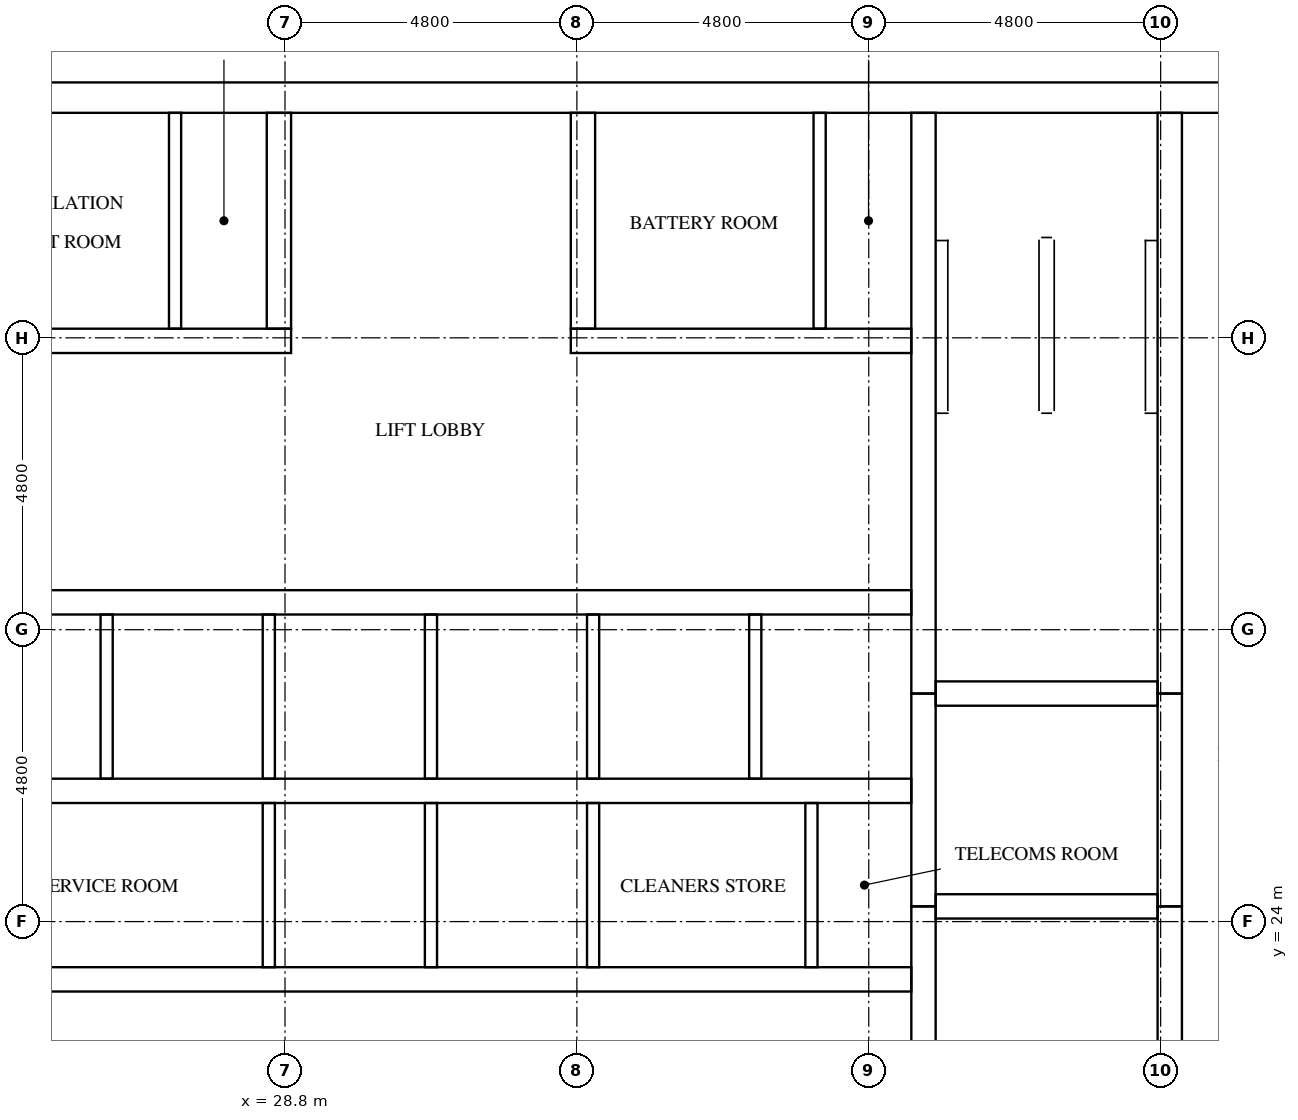
"""IFC4 building model, lengths in metres.
Left out: names, types, materials, properties, quantities, classifications, styles, units other than length and angle.
Written with IfcOpenShell. Run it as: python <this file> out.ifc"""

import sys

from ifc_helpers import new_model, si_unit, direction, frame, frame_2d, origin, place, context, subcontext, project, spatial, rectangle, extrude, element, fill, save


model = new_model("IFC4")
c1 = context("Model", 3, precision=1e-05, world=origin(), true_north=direction((0.0, 1.0)))
c2 = subcontext(c1, "Body", "Model", "MODEL_VIEW")
j1 = project(units=[si_unit("LENGTHUNIT", "METRE"), si_unit("PLANEANGLEUNIT", "RADIAN")], contexts=[c1])
p1 = place(None, origin())
s1 = spatial("IfcSite", under=j1, at=p1, CompositionType="ELEMENT")
p2 = place(p1, origin())
s2 = spatial("IfcBuilding", under=s1, at=p2, CompositionType="ELEMENT")
p3 = place(p2, frame((0.0, 0.0, 272.1)))
s3 = spatial("IfcBuildingStorey", under=s2, at=p3, CompositionType="ELEMENT", Elevation=272.1)
p4 = place(p3, frame((15.0, 37.55, 0.0), z_axis=(0.0, 0.0, 1.0), x_axis=(1.0, 0.0, 0.0)))
e1 = element("IfcWall", 1, at=p4, inside=s3, PredefinedType="SHEAR", context=c2, shape_type="SweptSolid", body=[
    extrude(rectangle(XDim=32.4, YDim=0.5, at=frame_2d((16.2, 0.0))), origin(), (0.0, 0.0, 1.0), 3.2),
])
p5 = place(p4, frame((15.3, 0.0, 0.0)))
e2 = element("IfcOpeningElement", 2, at=p5, cuts=e1, PredefinedType="OPENING", context=c2, shape_type="SweptSolid", body=[
    extrude(rectangle(XDim=1.8, YDim=2.1, at=frame_2d((0.9, 1.05))), frame((0.0, 0.26, 0.0), z_axis=(0.0, -1.0, 0.0), x_axis=(1.0, 0.0, 0.0)), (0.0, 0.0, 1.0), 0.52),
])
p6 = place(p4, frame((1.282, 0.0, 0.0)))
e3 = element("IfcOpeningElement", 3, at=p6, cuts=e1, PredefinedType="OPENING", context=c2, shape_type="SweptSolid", body=[
    extrude(rectangle(XDim=1.0, YDim=2.1, at=frame_2d((0.5, 1.05))), frame((0.0, 0.26, 0.0), z_axis=(0.0, -1.0, 0.0), x_axis=(1.0, 0.0, 0.0)), (0.0, 0.0, 1.0), 0.52),
])
p7 = place(p4, frame((5.082, 0.0, 0.0)))
e4 = element("IfcOpeningElement", 4, at=p7, cuts=e1, PredefinedType="OPENING", context=c2, shape_type="SweptSolid", body=[
    extrude(rectangle(XDim=1.0, YDim=2.1, at=frame_2d((0.5, 1.05))), frame((0.0, 0.26, 0.0), z_axis=(0.0, -1.0, 0.0), x_axis=(1.0, 0.0, 0.0)), (0.0, 0.0, 1.0), 0.52),
])
p8 = place(p3, frame((39.3, 15.5, 0.0), z_axis=(0.0, 0.0, 1.0), x_axis=(0.0, 1.0, 0.0)))
e5 = element("IfcWall", 5, at=p8, inside=s3, PredefinedType="SHEAR", context=c2, shape_type="SweptSolid", body=[
    extrude(rectangle(XDim=8.75, YDim=0.4, at=frame_2d((4.375, 0.0))), origin(), (0.0, 0.0, 1.0), 3.2),
])
p9 = place(p3, frame((39.3, 24.25, 0.0), z_axis=(0.0, 0.0, 1.0), x_axis=(0.0, 1.0, 0.0)))
e6 = element("IfcWall", 6, at=p9, inside=s3, PredefinedType="SHEAR", context=c2, shape_type="SweptSolid", body=[
    extrude(rectangle(XDim=3.5, YDim=0.4, at=frame_2d((1.75, 0.0))), origin(), (0.0, 0.0, 1.0), 3.2),
])
p10 = place(p3, frame((39.3, 27.75, 0.0), z_axis=(0.0, 0.0, 1.0), x_axis=(0.0, 1.0, 0.0)))
e7 = element("IfcWall", 7, at=p10, inside=s3, PredefinedType="SHEAR", context=c2, shape_type="SweptSolid", body=[
    extrude(rectangle(XDim=9.55, YDim=0.4, at=frame_2d((4.775, 0.0))), origin(), (0.0, 0.0, 1.0), 3.2),
])
p11 = place(p3, frame((43.35, 15.5, 0.0), z_axis=(0.0, 0.0, 1.0), x_axis=(0.0, 1.0, 0.0)))
e8 = element("IfcWall", 8, at=p11, inside=s3, PredefinedType="SHEAR", context=c2, shape_type="SweptSolid", body=[
    extrude(rectangle(XDim=8.75, YDim=0.4, at=frame_2d((4.375, 0.0))), origin(), (0.0, 0.0, 1.0), 3.2),
])
p12 = place(p11, frame((0.7, 0.0, 0.0)))
e9 = element("IfcOpeningElement", 9, at=p12, cuts=e8, PredefinedType="OPENING", context=c2, shape_type="SweptSolid", body=[
    extrude(rectangle(XDim=1.2, YDim=2.1, at=frame_2d((0.6, 1.05))), frame((0.0, 0.21, 0.0), z_axis=(0.0, -1.0, 0.0), x_axis=(1.0, 0.0, 0.0)), (0.0, 0.0, 1.0), 0.42),
])
p13 = place(p3, frame((43.35, 24.25, 0.0), z_axis=(0.0, 0.0, 1.0), x_axis=(0.0, 1.0, 0.0)))
e10 = element("IfcWall", 10, at=p13, inside=s3, PredefinedType="SHEAR", context=c2, shape_type="SweptSolid", body=[
    extrude(rectangle(XDim=3.5, YDim=0.4, at=frame_2d((1.75, 0.0))), origin(), (0.0, 0.0, 1.0), 3.2),
])
p14 = place(p13, frame((1.2, 0.0, 0.0)))
e11 = element("IfcOpeningElement", 11, at=p14, cuts=e10, PredefinedType="OPENING", context=c2, shape_type="SweptSolid", body=[
    extrude(rectangle(XDim=1.1, YDim=2.1, at=frame_2d((0.55, 1.05))), frame((0.0, 0.21, 0.0), z_axis=(0.0, -1.0, 0.0), x_axis=(1.0, 0.0, 0.0)), (0.0, 0.0, 1.0), 0.42),
])
p15 = place(p3, frame((43.35, 27.75, 0.0), z_axis=(0.0, 0.0, 1.0), x_axis=(0.0, 1.0, 0.0)))
e12 = element("IfcWall", 12, at=p15, inside=s3, PredefinedType="SHEAR", context=c2, shape_type="SweptSolid", body=[
    extrude(rectangle(XDim=9.55, YDim=0.4, at=frame_2d((4.775, 0.0))), origin(), (0.0, 0.0, 1.0), 3.2),
])
p16 = place(p15, frame((7.65, 0.0, 0.0)))
e13 = element("IfcOpeningElement", 13, at=p16, cuts=e12, PredefinedType="OPENING", context=c2, shape_type="SweptSolid", body=[
    extrude(rectangle(XDim=1.2, YDim=2.1, at=frame_2d((0.6, 1.05))), frame((0.0, 0.21, 0.0), z_axis=(0.0, -1.0, 0.0), x_axis=(1.0, 0.0, 0.0)), (0.0, 0.0, 1.0), 0.42),
])
for number, where, z_axis, x_axis in (
    (14, (39.5, 24.25, 0.0), (0.0, 0.0, 1.0), (1.0, 0.0, 0.0)),
    (15, (39.5, 27.75, 0.0), (0.0, 0.0, 1.0), (1.0, 0.0, 0.0)),
):
    element("IfcWall", number, at=place(p3, frame(where, z_axis=z_axis, x_axis=x_axis)), inside=s3, PredefinedType="SHEAR", context=c2, shape_type="SweptSolid", body=[
        extrude(rectangle(XDim=3.65, YDim=0.4, at=frame_2d((1.825, 0.0))), origin(), (0.0, 0.0, 1.0), 3.2),
    ])
p17 = place(p3, frame((23.3, 23.05, 0.0), z_axis=(0.0, 0.0, 1.0), x_axis=(1.0, 0.0, 0.0)))
e16 = element("IfcWall", 16, at=p17, inside=s3, PredefinedType="SHEAR", context=c2, shape_type="SweptSolid", body=[
    extrude(rectangle(XDim=15.8, YDim=0.4, at=frame_2d((7.9, 0.0))), origin(), (0.0, 0.0, 1.0), 3.2),
])
p18 = place(p17, frame((2.067, 0.0, 0.0)))
e17 = element("IfcOpeningElement", 17, at=p18, cuts=e16, PredefinedType="OPENING", context=c2, shape_type="SweptSolid", body=[
    extrude(rectangle(XDim=1.0, YDim=2.1, at=frame_2d((0.5, 1.05))), frame((0.0, 0.21, 0.0), z_axis=(0.0, -1.0, 0.0), x_axis=(1.0, 0.0, 0.0)), (0.0, 0.0, 1.0), 0.42),
])
p19 = place(p17, frame((11.862, 0.0, 0.0)))
e18 = element("IfcOpeningElement", 18, at=p19, cuts=e16, PredefinedType="OPENING", context=c2, shape_type="SweptSolid", body=[
    extrude(rectangle(XDim=1.0, YDim=2.1, at=frame_2d((0.5, 1.05))), frame((0.0, 0.21, 0.0), z_axis=(0.0, -1.0, 0.0), x_axis=(1.0, 0.0, 0.0)), (0.0, 0.0, 1.0), 0.42),
])
p20 = place(p17, frame((14.529, 0.0, 0.0)))
e19 = element("IfcOpeningElement", 19, at=p20, cuts=e16, PredefinedType="OPENING", context=c2, shape_type="SweptSolid", body=[
    extrude(rectangle(XDim=1.0, YDim=2.1, at=frame_2d((0.5, 1.05))), frame((0.0, 0.21, 0.0), z_axis=(0.0, -1.0, 0.0), x_axis=(1.0, 0.0, 0.0)), (0.0, 0.0, 1.0), 0.42),
])
p21 = place(p3, frame((23.3, 26.15, 0.0), z_axis=(0.0, 0.0, 1.0), x_axis=(1.0, 0.0, 0.0)))
e20 = element("IfcWall", 20, at=p21, inside=s3, PredefinedType="SHEAR", context=c2, shape_type="SweptSolid", body=[
    extrude(rectangle(XDim=15.8, YDim=0.4, at=frame_2d((7.9, 0.0))), origin(), (0.0, 0.0, 1.0), 3.2),
])
p22 = place(p3, frame((23.3, 29.25, 0.0), z_axis=(0.0, 0.0, 1.0), x_axis=(1.0, 0.0, 0.0)))
e21 = element("IfcWall", 21, at=p22, inside=s3, PredefinedType="SHEAR", context=c2, shape_type="SweptSolid", body=[
    extrude(rectangle(XDim=15.8, YDim=0.4, at=frame_2d((7.9, 0.0))), origin(), (0.0, 0.0, 1.0), 3.2),
])
p23 = place(p22, frame((0.683, 0.0, 0.0)))
e22 = element("IfcOpeningElement", 22, at=p23, cuts=e21, PredefinedType="OPENING", context=c2, shape_type="SweptSolid", body=[
    extrude(rectangle(XDim=1.1, YDim=2.1, at=frame_2d((0.55, 1.05))), frame((0.0, 0.21, 0.0), z_axis=(0.0, -1.0, 0.0), x_axis=(1.0, 0.0, 0.0)), (0.0, 0.0, 1.0), 0.42),
])
p24 = place(p22, frame((3.35, 0.0, 0.0)))
e23 = element("IfcOpeningElement", 23, at=p24, cuts=e21, PredefinedType="OPENING", context=c2, shape_type="SweptSolid", body=[
    extrude(rectangle(XDim=1.1, YDim=2.1, at=frame_2d((0.55, 1.05))), frame((0.0, 0.21, 0.0), z_axis=(0.0, -1.0, 0.0), x_axis=(1.0, 0.0, 0.0)), (0.0, 0.0, 1.0), 0.42),
])
p25 = place(p22, frame((6.017, 0.0, 0.0)))
e24 = element("IfcOpeningElement", 24, at=p25, cuts=e21, PredefinedType="OPENING", context=c2, shape_type="SweptSolid", body=[
    extrude(rectangle(XDim=1.1, YDim=2.1, at=frame_2d((0.55, 1.05))), frame((0.0, 0.21, 0.0), z_axis=(0.0, -1.0, 0.0), x_axis=(1.0, 0.0, 0.0)), (0.0, 0.0, 1.0), 0.42),
])
p26 = place(p22, frame((8.683, 0.0, 0.0)))
e25 = element("IfcOpeningElement", 25, at=p26, cuts=e21, PredefinedType="OPENING", context=c2, shape_type="SweptSolid", body=[
    extrude(rectangle(XDim=1.1, YDim=2.1, at=frame_2d((0.55, 1.05))), frame((0.0, 0.21, 0.0), z_axis=(0.0, -1.0, 0.0), x_axis=(1.0, 0.0, 0.0)), (0.0, 0.0, 1.0), 0.42),
])
p27 = place(p22, frame((11.35, 0.0, 0.0)))
e26 = element("IfcOpeningElement", 26, at=p27, cuts=e21, PredefinedType="OPENING", context=c2, shape_type="SweptSolid", body=[
    extrude(rectangle(XDim=1.1, YDim=2.1, at=frame_2d((0.55, 1.05))), frame((0.0, 0.21, 0.0), z_axis=(0.0, -1.0, 0.0), x_axis=(1.0, 0.0, 0.0)), (0.0, 0.0, 1.0), 0.42),
])
p28 = place(p22, frame((14.017, 0.0, 0.0)))
e27 = element("IfcOpeningElement", 27, at=p28, cuts=e21, PredefinedType="OPENING", context=c2, shape_type="SweptSolid", body=[
    extrude(rectangle(XDim=1.1, YDim=2.1, at=frame_2d((0.55, 1.05))), frame((0.0, 0.21, 0.0), z_axis=(0.0, -1.0, 0.0), x_axis=(1.0, 0.0, 0.0)), (0.0, 0.0, 1.0), 0.42),
])
p29 = place(p3, frame((23.3, 33.55, 0.0), z_axis=(0.0, 0.0, 1.0), x_axis=(1.0, 0.0, 0.0)))
e28 = element("IfcWall", 28, at=p29, inside=s3, PredefinedType="SHEAR", context=c2, shape_type="SweptSolid", body=[
    extrude(rectangle(XDim=5.6, YDim=0.4, at=frame_2d((2.8, 0.0))), origin(), (0.0, 0.0, 1.0), 3.2),
])
p30 = place(p29, frame((1.296, 0.0, 0.0)))
e29 = element("IfcOpeningElement", 29, at=p30, cuts=e28, PredefinedType="OPENING", context=c2, shape_type="SweptSolid", body=[
    extrude(rectangle(XDim=1.0, YDim=2.1, at=frame_2d((0.5, 1.05))), frame((0.0, 0.21, 0.0), z_axis=(0.0, -1.0, 0.0), x_axis=(1.0, 0.0, 0.0)), (0.0, 0.0, 1.0), 0.42),
])
p31 = place(p29, frame((3.996, 0.0, 0.0)))
e30 = element("IfcOpeningElement", 30, at=p31, cuts=e28, PredefinedType="OPENING", context=c2, shape_type="SweptSolid", body=[
    extrude(rectangle(XDim=1.0, YDim=2.1, at=frame_2d((0.5, 1.05))), frame((0.0, 0.21, 0.0), z_axis=(0.0, -1.0, 0.0), x_axis=(1.0, 0.0, 0.0)), (0.0, 0.0, 1.0), 0.42),
])
p32 = place(p3, frame((33.5, 33.55, 0.0), z_axis=(0.0, 0.0, 1.0), x_axis=(1.0, 0.0, 0.0)))
e31 = element("IfcWall", 31, at=p32, inside=s3, PredefinedType="SHEAR", context=c2, shape_type="SweptSolid", body=[
    extrude(rectangle(XDim=5.6, YDim=0.4, at=frame_2d((2.8, 0.0))), origin(), (0.0, 0.0, 1.0), 3.2),
])
p33 = place(p32, frame((1.696, 0.0, 0.0)))
e32 = element("IfcOpeningElement", 32, at=p33, cuts=e31, PredefinedType="OPENING", context=c2, shape_type="SweptSolid", body=[
    extrude(rectangle(XDim=1.0, YDim=2.1, at=frame_2d((0.5, 1.05))), frame((0.0, 0.21, 0.0), z_axis=(0.0, -1.0, 0.0), x_axis=(1.0, 0.0, 0.0)), (0.0, 0.0, 1.0), 0.42),
])
p34 = place(p32, frame((4.396, 0.0, 0.0)))
e33 = element("IfcOpeningElement", 33, at=p34, cuts=e31, PredefinedType="OPENING", context=c2, shape_type="SweptSolid", body=[
    extrude(rectangle(XDim=1.0, YDim=2.1, at=frame_2d((0.5, 1.05))), frame((0.0, 0.21, 0.0), z_axis=(0.0, -1.0, 0.0), x_axis=(1.0, 0.0, 0.0)), (0.0, 0.0, 1.0), 0.42),
])
for number, where, z_axis, x_axis in (
    (34, (28.7, 33.75, 0.0), (0.0, 0.0, 1.0), (0.0, 1.0, 0.0)),
    (35, (33.7, 33.75, 0.0), (0.0, 0.0, 1.0), (0.0, 1.0, 0.0)),
):
    element("IfcWall", number, at=place(p3, frame(where, z_axis=z_axis, x_axis=x_axis)), inside=s3, PredefinedType="SHEAR", context=c2, shape_type="SweptSolid", body=[
        extrude(rectangle(XDim=3.55, YDim=0.4, at=frame_2d((1.775, 0.0))), origin(), (0.0, 0.0, 1.0), 3.2),
    ])
for number, where, z_axis, x_axis in (
    (36, (25.867, 26.35, 0.0), (0.0, 0.0, 1.0), (0.0, 1.0, 0.0)),
    (37, (28.533, 23.25, 0.0), (0.0, 0.0, 1.0), (0.0, 1.0, 0.0)),
    (38, (28.533, 26.35, 0.0), (0.0, 0.0, 1.0), (0.0, 1.0, 0.0)),
    (39, (31.2, 23.25, 0.0), (0.0, 0.0, 1.0), (0.0, 1.0, 0.0)),
    (40, (31.2, 26.35, 0.0), (0.0, 0.0, 1.0), (0.0, 1.0, 0.0)),
    (41, (33.867, 23.25, 0.0), (0.0, 0.0, 1.0), (0.0, 1.0, 0.0)),
    (42, (33.867, 26.35, 0.0), (0.0, 0.0, 1.0), (0.0, 1.0, 0.0)),
    (43, (36.533, 26.35, 0.0), (0.0, 0.0, 1.0), (0.0, 1.0, 0.0)),
):
    element("IfcWall", number, at=place(p3, frame(where, z_axis=z_axis, x_axis=x_axis)), inside=s3, PredefinedType="SOLIDWALL", context=c2, shape_type="SweptSolid", body=[
        extrude(rectangle(XDim=2.7, YDim=0.2, at=frame_2d((1.35, 0.0))), origin(), (0.0, 0.0, 1.0), 3.2),
    ])
p35 = place(p3, frame((37.457, 23.25, 0.0), z_axis=(0.0, 0.0, 1.0), x_axis=(0.0, 1.0, 0.0)))
e44 = element("IfcWall", 44, at=p35, inside=s3, PredefinedType="PARTITIONING", context=c2, shape_type="SweptSolid", body=[
    extrude(rectangle(XDim=2.7, YDim=0.2, at=frame_2d((1.35, 0.0))), origin(), (0.0, 0.0, 1.0), 3.2),
])
for number, where, z_axis, x_axis in (
    (45, (26.992, 33.75, 0.0), (0.0, 0.0, 1.0), (0.0, 1.0, 0.0)),
    (46, (37.592, 33.75, 0.0), (0.0, 0.0, 1.0), (0.0, 1.0, 0.0)),
):
    element("IfcWall", number, at=place(p3, frame(where, z_axis=z_axis, x_axis=x_axis)), inside=s3, PredefinedType="PARTITIONING", context=c2, shape_type="SweptSolid", body=[
        extrude(rectangle(XDim=3.55, YDim=0.2, at=frame_2d((1.775, 0.0))), origin(), (0.0, 0.0, 1.0), 3.2),
    ])
p36 = place(p23, origin())
e47 = element("IfcDoor", 47, at=p36, inside=s3, OperationType="DOUBLE_DOOR_SLIDING", PredefinedType="DOOR", context=c2, shape_type="SweptSolid", body=[
    extrude(rectangle(XDim=1.1, YDim=2.1, at=frame_2d((0.55, 1.05))), frame((0.0, 0.025, 0.0), z_axis=(0.0, -1.0, 0.0), x_axis=(1.0, 0.0, 0.0)), (0.0, 0.0, 1.0), 0.05),
])
fill(e22, e47)
p37 = place(p24, origin())
e48 = element("IfcDoor", 48, at=p37, inside=s3, OperationType="DOUBLE_DOOR_SLIDING", PredefinedType="DOOR", context=c2, shape_type="SweptSolid", body=[
    extrude(rectangle(XDim=1.1, YDim=2.1, at=frame_2d((0.55, 1.05))), frame((0.0, 0.025, 0.0), z_axis=(0.0, -1.0, 0.0), x_axis=(1.0, 0.0, 0.0)), (0.0, 0.0, 1.0), 0.05),
])
fill(e23, e48)
p38 = place(p25, origin())
e49 = element("IfcDoor", 49, at=p38, inside=s3, OperationType="DOUBLE_DOOR_SLIDING", PredefinedType="DOOR", context=c2, shape_type="SweptSolid", body=[
    extrude(rectangle(XDim=1.1, YDim=2.1, at=frame_2d((0.55, 1.05))), frame((0.0, 0.025, 0.0), z_axis=(0.0, -1.0, 0.0), x_axis=(1.0, 0.0, 0.0)), (0.0, 0.0, 1.0), 0.05),
])
fill(e24, e49)
p39 = place(p26, origin())
e50 = element("IfcDoor", 50, at=p39, inside=s3, OperationType="DOUBLE_DOOR_SLIDING", PredefinedType="DOOR", context=c2, shape_type="SweptSolid", body=[
    extrude(rectangle(XDim=1.1, YDim=2.1, at=frame_2d((0.55, 1.05))), frame((0.0, 0.025, 0.0), z_axis=(0.0, -1.0, 0.0), x_axis=(1.0, 0.0, 0.0)), (0.0, 0.0, 1.0), 0.05),
])
fill(e25, e50)
p40 = place(p27, origin())
e51 = element("IfcDoor", 51, at=p40, inside=s3, OperationType="DOUBLE_DOOR_SLIDING", PredefinedType="DOOR", context=c2, shape_type="SweptSolid", body=[
    extrude(rectangle(XDim=1.1, YDim=2.1, at=frame_2d((0.55, 1.05))), frame((0.0, 0.025, 0.0), z_axis=(0.0, -1.0, 0.0), x_axis=(1.0, 0.0, 0.0)), (0.0, 0.0, 1.0), 0.05),
])
fill(e26, e51)
p41 = place(p28, origin())
e52 = element("IfcDoor", 52, at=p41, inside=s3, OperationType="DOUBLE_DOOR_SLIDING", PredefinedType="DOOR", context=c2, shape_type="SweptSolid", body=[
    extrude(rectangle(XDim=1.1, YDim=2.1, at=frame_2d((0.55, 1.05))), frame((0.0, 0.025, 0.0), z_axis=(0.0, -1.0, 0.0), x_axis=(1.0, 0.0, 0.0)), (0.0, 0.0, 1.0), 0.05),
])
fill(e27, e52)
p42 = place(p14, origin())
e53 = element("IfcDoor", 53, at=p42, inside=s3, OperationType="DOUBLE_DOOR_SLIDING", PredefinedType="DOOR", context=c2, shape_type="SweptSolid", body=[
    extrude(rectangle(XDim=1.1, YDim=2.1, at=frame_2d((0.55, 1.05))), frame((0.0, 0.025, 0.0), z_axis=(0.0, -1.0, 0.0), x_axis=(1.0, 0.0, 0.0)), (0.0, 0.0, 1.0), 0.05),
])
fill(e11, e53)
p43 = place(p16, origin())
e54 = element("IfcDoor", 54, at=p43, inside=s3, OperationType="SINGLE_SWING_LEFT", PredefinedType="DOOR", context=c2, shape_type="SweptSolid", body=[
    extrude(rectangle(XDim=1.2, YDim=2.1, at=frame_2d((0.6, 1.05))), frame((0.0, 0.025, 0.0), z_axis=(0.0, -1.0, 0.0), x_axis=(1.0, 0.0, 0.0)), (0.0, 0.0, 1.0), 0.05),
])
fill(e13, e54)
p44 = place(p5, origin())
e55 = element("IfcDoor", 55, at=p44, inside=s3, OperationType="DOUBLE_DOOR_SINGLE_SWING", PredefinedType="DOOR", context=c2, shape_type="SweptSolid", body=[
    extrude(rectangle(XDim=1.8, YDim=2.1, at=frame_2d((0.9, 1.05))), frame((0.0, 0.025, 0.0), z_axis=(0.0, -1.0, 0.0), x_axis=(1.0, 0.0, 0.0)), (0.0, 0.0, 1.0), 0.05),
])
fill(e2, e55)
p45 = place(p18, frame((1.0, 0.0, 0.0), z_axis=(0.0, 0.0, 1.0), x_axis=(-1.0, 0.0, 0.0)))
e56 = element("IfcDoor", 56, at=p45, inside=s3, OperationType="SINGLE_SWING_RIGHT", PredefinedType="DOOR", context=c2, shape_type="SweptSolid", body=[
    extrude(rectangle(XDim=1.0, YDim=2.1, at=frame_2d((0.5, 1.05))), frame((0.0, 0.025, 0.0), z_axis=(0.0, -1.0, 0.0), x_axis=(1.0, 0.0, 0.0)), (0.0, 0.0, 1.0), 0.05),
])
fill(e17, e56)
p46 = place(p19, frame((1.0, 0.0, 0.0), z_axis=(0.0, 0.0, 1.0), x_axis=(-1.0, 0.0, 0.0)))
e57 = element("IfcDoor", 57, at=p46, inside=s3, OperationType="SINGLE_SWING_LEFT", PredefinedType="DOOR", context=c2, shape_type="SweptSolid", body=[
    extrude(rectangle(XDim=1.0, YDim=2.1, at=frame_2d((0.5, 1.05))), frame((0.0, 0.025, 0.0), z_axis=(0.0, -1.0, 0.0), x_axis=(1.0, 0.0, 0.0)), (0.0, 0.0, 1.0), 0.05),
])
fill(e18, e57)
p47 = place(p20, frame((1.0, 0.0, 0.0), z_axis=(0.0, 0.0, 1.0), x_axis=(-1.0, 0.0, 0.0)))
e58 = element("IfcDoor", 58, at=p47, inside=s3, OperationType="SINGLE_SWING_RIGHT", PredefinedType="DOOR", context=c2, shape_type="SweptSolid", body=[
    extrude(rectangle(XDim=1.0, YDim=2.1, at=frame_2d((0.5, 1.05))), frame((0.0, 0.025, 0.0), z_axis=(0.0, -1.0, 0.0), x_axis=(1.0, 0.0, 0.0)), (0.0, 0.0, 1.0), 0.05),
])
fill(e19, e58)
p48 = place(p30, frame((1.0, 0.0, 0.0), z_axis=(0.0, 0.0, 1.0), x_axis=(-1.0, 0.0, 0.0)))
e59 = element("IfcDoor", 59, at=p48, inside=s3, OperationType="SINGLE_SWING_LEFT", PredefinedType="DOOR", context=c2, shape_type="SweptSolid", body=[
    extrude(rectangle(XDim=1.0, YDim=2.1, at=frame_2d((0.5, 1.05))), frame((0.0, 0.025, 0.0), z_axis=(0.0, -1.0, 0.0), x_axis=(1.0, 0.0, 0.0)), (0.0, 0.0, 1.0), 0.05),
])
fill(e29, e59)
p49 = place(p31, frame((1.0, 0.0, 0.0), z_axis=(0.0, 0.0, 1.0), x_axis=(-1.0, 0.0, 0.0)))
e60 = element("IfcDoor", 60, at=p49, inside=s3, OperationType="SINGLE_SWING_RIGHT", PredefinedType="DOOR", context=c2, shape_type="SweptSolid", body=[
    extrude(rectangle(XDim=1.0, YDim=2.1, at=frame_2d((0.5, 1.05))), frame((0.0, 0.025, 0.0), z_axis=(0.0, -1.0, 0.0), x_axis=(1.0, 0.0, 0.0)), (0.0, 0.0, 1.0), 0.05),
])
fill(e30, e60)
p50 = place(p33, frame((1.0, 0.0, 0.0), z_axis=(0.0, 0.0, 1.0), x_axis=(-1.0, 0.0, 0.0)))
e61 = element("IfcDoor", 61, at=p50, inside=s3, OperationType="SINGLE_SWING_LEFT", PredefinedType="DOOR", context=c2, shape_type="SweptSolid", body=[
    extrude(rectangle(XDim=1.0, YDim=2.1, at=frame_2d((0.5, 1.05))), frame((0.0, 0.025, 0.0), z_axis=(0.0, -1.0, 0.0), x_axis=(1.0, 0.0, 0.0)), (0.0, 0.0, 1.0), 0.05),
])
fill(e32, e61)
p51 = place(p34, frame((1.0, 0.0, 0.0), z_axis=(0.0, 0.0, 1.0), x_axis=(-1.0, 0.0, 0.0)))
e62 = element("IfcDoor", 62, at=p51, inside=s3, OperationType="SINGLE_SWING_RIGHT", PredefinedType="DOOR", context=c2, shape_type="SweptSolid", body=[
    extrude(rectangle(XDim=1.0, YDim=2.1, at=frame_2d((0.5, 1.05))), frame((0.0, 0.025, 0.0), z_axis=(0.0, -1.0, 0.0), x_axis=(1.0, 0.0, 0.0)), (0.0, 0.0, 1.0), 0.05),
])
fill(e33, e62)
save(model, sys.argv[1])
